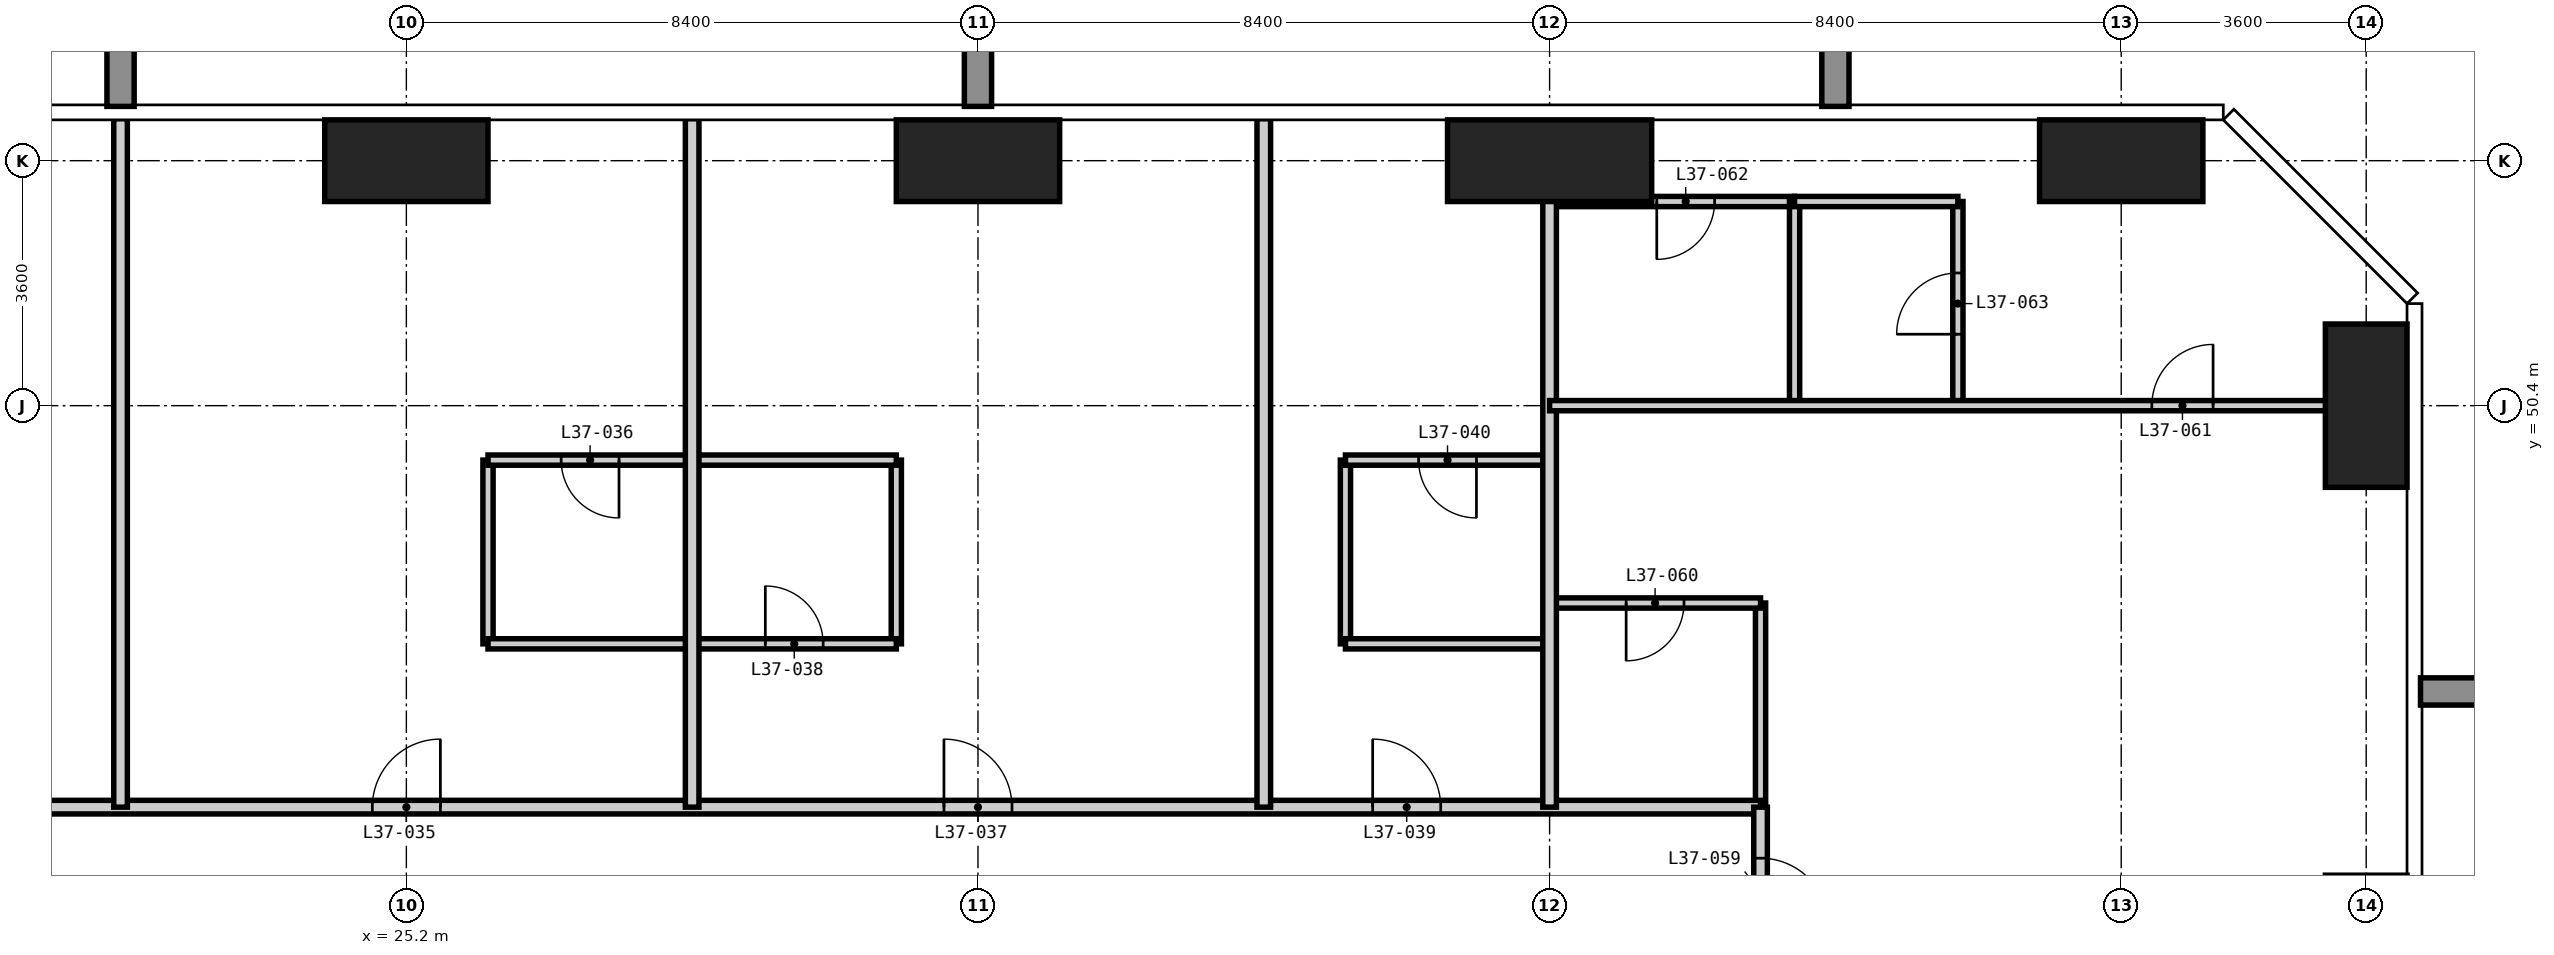
"""IFC4 building model, lengths in metres.
Left out: names, types, materials, properties, quantities, classifications, styles, units other than length and angle.
Written with IfcOpenShell. Run it as: python <this file> out.ifc"""

import sys

from ifc_helpers import new_model, si_unit, direction, frame, frame_2d, origin, origin_2d, place, context, subcontext, project, spatial, rectangle, extrude, element, fill, save


model = new_model("IFC4")
c1 = context("Model", 3, precision=1e-05, world=origin(), true_north=direction((0.0, 1.0)))
c2 = subcontext(c1, "Body", "Model", "MODEL_VIEW")
j1 = project(units=[si_unit("LENGTHUNIT", "METRE"), si_unit("PLANEANGLEUNIT", "RADIAN")], contexts=[c1])
p1 = place(None, origin())
s1 = spatial("IfcSite", under=j1, at=p1, CompositionType="ELEMENT")
p2 = place(p1, origin())
s2 = spatial("IfcBuilding", under=s1, at=p2, CompositionType="ELEMENT")
p3 = place(p2, frame((0.0, 0.0, 144.0)))
s3 = spatial("IfcBuildingStorey", under=s2, at=p3, CompositionType="ELEMENT", Elevation=144.0)
for number, where, z_axis, x_axis in (
    (1, (25.2, 54.0, -0.35), (0.0, 0.0, 1.0), (1.0, 0.0, 0.0)),
    (2, (33.6, 54.0, -0.35), (0.0, 0.0, 1.0), (1.0, 0.0, 0.0)),
):
    element("IfcColumn", number, at=place(p3, frame(where, z_axis=z_axis, x_axis=x_axis)), inside=s3, PredefinedType="COLUMN", context=c2, shape_type="SweptSolid", body=[
        extrude(rectangle(XDim=2.4, YDim=1.2, at=origin_2d()), origin(), (0.0, 0.0, 1.0), 3.6),
    ])
p4 = place(p3, frame((42.0, 54.0, -0.35), z_axis=(0.0, 0.0, 1.0), x_axis=(1.0, 0.0, 0.0)))
e3 = element("IfcColumn", 3, at=p4, inside=s3, PredefinedType="COLUMN", context=c2, shape_type="SweptSolid", body=[
    extrude(rectangle(XDim=3.0, YDim=1.2, at=origin_2d()), origin(), (0.0, 0.0, 1.0), 3.6),
])
p5 = place(p3, frame((50.4, 54.0, -0.35), z_axis=(0.0, 0.0, 1.0), x_axis=(1.0, 0.0, 0.0)))
e4 = element("IfcColumn", 4, at=p5, inside=s3, PredefinedType="COLUMN", context=c2, shape_type="SweptSolid", body=[
    extrude(rectangle(XDim=2.4, YDim=1.2, at=origin_2d()), origin(), (0.0, 0.0, 1.0), 3.6),
])
p6 = place(p3, frame((54.0, 50.4, -0.35), z_axis=(0.0, 0.0, 1.0), x_axis=(1.0, 0.0, 0.0)))
e5 = element("IfcColumn", 5, at=p6, inside=s3, PredefinedType="COLUMN", context=c2, shape_type="SweptSolid", body=[
    extrude(rectangle(XDim=1.2, YDim=2.4, at=origin_2d()), origin(), (0.0, 0.0, 1.0), 3.6),
])
for number, where, z_axis, x_axis in (
    (6, (26.4, 46.9, 0.0), (0.0, 0.0, 1.0), (0.0, 1.0, 0.0)),
    (7, (32.4, 46.9, 0.0), (0.0, 0.0, 1.0), (0.0, 1.0, 0.0)),
    (8, (39.0, 46.9, 0.0), (0.0, 0.0, 1.0), (0.0, 1.0, 0.0)),
):
    element("IfcWall", number, at=place(p3, frame(where, z_axis=z_axis, x_axis=x_axis)), inside=s3, PredefinedType="PARTITIONING", context=c2, shape_type="SweptSolid", body=[
        extrude(rectangle(XDim=2.7, YDim=0.15, at=frame_2d((1.35, 0.0))), origin(), (0.0, 0.0, 1.0), 3.25),
    ])
p7 = place(p3, frame((45.1, 44.5, 0.0), z_axis=(0.0, 0.0, 1.0), x_axis=(0.0, 1.0, 0.0)))
e9 = element("IfcWall", 9, at=p7, inside=s3, PredefinedType="PARTITIONING", context=c2, shape_type="SweptSolid", body=[
    extrude(rectangle(XDim=3.0, YDim=0.15, at=frame_2d((1.5, 0.0))), origin(), (0.0, 0.0, 1.0), 3.25),
])
p8 = place(p3, frame((26.4, 46.9, 0.0), z_axis=(0.0, 0.0, 1.0), x_axis=(1.0, 0.0, 0.0)))
e10 = element("IfcWall", 10, at=p8, inside=s3, PredefinedType="PARTITIONING", context=c2, shape_type="SweptSolid", body=[
    extrude(rectangle(XDim=6.0, YDim=0.15, at=frame_2d((3.0, 0.0))), origin(), (0.0, 0.0, 1.0), 3.25),
])
p9 = place(p8, frame((4.075, 0.0, 0.0)))
e11 = element("IfcOpeningElement", 11, at=p9, cuts=e10, PredefinedType="OPENING", context=c2, shape_type="SweptSolid", body=[
    extrude(rectangle(XDim=0.85, YDim=2.1, at=frame_2d((0.425, 1.05))), frame((0.0, 0.085, 0.0), z_axis=(0.0, -1.0, 0.0), x_axis=(1.0, 0.0, 0.0)), (0.0, 0.0, 1.0), 0.17),
])
p10 = place(p3, frame((39.0, 46.9, 0.0), z_axis=(0.0, 0.0, 1.0), x_axis=(1.0, 0.0, 0.0)))
e12 = element("IfcWall", 12, at=p10, inside=s3, PredefinedType="PARTITIONING", context=c2, shape_type="SweptSolid", body=[
    extrude(rectangle(XDim=3.0, YDim=0.15, at=frame_2d((1.5, 0.0))), origin(), (0.0, 0.0, 1.0), 3.25),
])
p11 = place(p3, frame((42.0, 47.5, 0.0), z_axis=(0.0, 0.0, 1.0), x_axis=(1.0, 0.0, 0.0)))
e13 = element("IfcWall", 13, at=p11, inside=s3, PredefinedType="PARTITIONING", context=c2, shape_type="SweptSolid", body=[
    extrude(rectangle(XDim=3.1, YDim=0.15, at=frame_2d((1.55, 0.0))), origin(), (0.0, 0.0, 1.0), 3.25),
])
p12 = place(p11, frame((1.125, 0.0, 0.0)))
e14 = element("IfcOpeningElement", 14, at=p12, cuts=e13, PredefinedType="OPENING", context=c2, shape_type="SweptSolid", body=[
    extrude(rectangle(XDim=0.85, YDim=2.1, at=frame_2d((0.425, 1.05))), frame((0.0, 0.085, 0.0), z_axis=(0.0, -1.0, 0.0), x_axis=(1.0, 0.0, 0.0)), (0.0, 0.0, 1.0), 0.17),
])
p13 = place(p3, frame((26.4, 49.6, 0.0), z_axis=(0.0, 0.0, 1.0), x_axis=(1.0, 0.0, 0.0)))
e15 = element("IfcWall", 15, at=p13, inside=s3, PredefinedType="PARTITIONING", context=c2, shape_type="SweptSolid", body=[
    extrude(rectangle(XDim=6.0, YDim=0.15, at=frame_2d((3.0, 0.0))), origin(), (0.0, 0.0, 1.0), 3.25),
])
p14 = place(p13, frame((1.075, 0.0, 0.0)))
e16 = element("IfcOpeningElement", 16, at=p14, cuts=e15, PredefinedType="OPENING", context=c2, shape_type="SweptSolid", body=[
    extrude(rectangle(XDim=0.85, YDim=2.1, at=frame_2d((0.425, 1.05))), frame((0.0, 0.085, 0.0), z_axis=(0.0, -1.0, 0.0), x_axis=(1.0, 0.0, 0.0)), (0.0, 0.0, 1.0), 0.17),
])
p15 = place(p3, frame((39.0, 49.6, 0.0), z_axis=(0.0, 0.0, 1.0), x_axis=(1.0, 0.0, 0.0)))
e17 = element("IfcWall", 17, at=p15, inside=s3, PredefinedType="PARTITIONING", context=c2, shape_type="SweptSolid", body=[
    extrude(rectangle(XDim=3.0, YDim=0.15, at=frame_2d((1.5, 0.0))), origin(), (0.0, 0.0, 1.0), 3.25),
])
p16 = place(p15, frame((1.075, 0.0, 0.0)))
e18 = element("IfcOpeningElement", 18, at=p16, cuts=e17, PredefinedType="OPENING", context=c2, shape_type="SweptSolid", body=[
    extrude(rectangle(XDim=0.85, YDim=2.1, at=frame_2d((0.425, 1.05))), frame((0.0, 0.085, 0.0), z_axis=(0.0, -1.0, 0.0), x_axis=(1.0, 0.0, 0.0)), (0.0, 0.0, 1.0), 0.17),
])
p17 = place(p3, frame((42.0, 53.4, 0.0), z_axis=(0.0, 0.0, 1.0), x_axis=(1.0, 0.0, 0.0)))
e19 = element("IfcWall", 19, at=p17, inside=s3, PredefinedType="PARTITIONING", context=c2, shape_type="SweptSolid", body=[
    extrude(rectangle(XDim=3.6, YDim=0.15, at=frame_2d((1.8, 0.0))), origin(), (0.0, 0.0, 1.0), 3.25),
])
p18 = place(p17, frame((1.575, 0.0, 0.0)))
e20 = element("IfcOpeningElement", 20, at=p18, cuts=e19, PredefinedType="OPENING", context=c2, shape_type="SweptSolid", body=[
    extrude(rectangle(XDim=0.85, YDim=2.1, at=frame_2d((0.425, 1.05))), frame((0.0, 0.085, 0.0), z_axis=(0.0, -1.0, 0.0), x_axis=(1.0, 0.0, 0.0)), (0.0, 0.0, 1.0), 0.17),
])
p19 = place(p3, frame((12.6, 44.5, 0.0), z_axis=(0.0, 0.0, 1.0), x_axis=(1.0, 0.0, 0.0)))
e21 = element("IfcWall", 21, at=p19, inside=s3, PredefinedType="PARTITIONING", context=c2, shape_type="SweptSolid", body=[
    extrude(rectangle(XDim=32.5, YDim=0.2, at=frame_2d((16.25, 0.0))), origin(), (0.0, 0.0, 1.0), 3.25),
])
p20 = place(p19, frame((5.8, 0.0, 0.0)))
e22 = element("IfcOpeningElement", 22, at=p20, cuts=e21, PredefinedType="OPENING", context=c2, shape_type="SweptSolid", body=[
    extrude(rectangle(XDim=1.0, YDim=2.2, at=frame_2d((0.5, 1.1))), frame((0.0, 0.11, 0.0), z_axis=(0.0, -1.0, 0.0), x_axis=(1.0, 0.0, 0.0)), (0.0, 0.0, 1.0), 0.22),
])
p21 = place(p19, frame((12.1, 0.0, 0.0)))
e23 = element("IfcOpeningElement", 23, at=p21, cuts=e21, PredefinedType="OPENING", context=c2, shape_type="SweptSolid", body=[
    extrude(rectangle(XDim=1.0, YDim=2.2, at=frame_2d((0.5, 1.1))), frame((0.0, 0.11, 0.0), z_axis=(0.0, -1.0, 0.0), x_axis=(1.0, 0.0, 0.0)), (0.0, 0.0, 1.0), 0.22),
])
p22 = place(p19, frame((20.5, 0.0, 0.0)))
e24 = element("IfcOpeningElement", 24, at=p22, cuts=e21, PredefinedType="OPENING", context=c2, shape_type="SweptSolid", body=[
    extrude(rectangle(XDim=1.0, YDim=2.2, at=frame_2d((0.5, 1.1))), frame((0.0, 0.11, 0.0), z_axis=(0.0, -1.0, 0.0), x_axis=(1.0, 0.0, 0.0)), (0.0, 0.0, 1.0), 0.22),
])
p23 = place(p19, frame((26.8, 0.0, 0.0)))
e25 = element("IfcOpeningElement", 25, at=p23, cuts=e21, PredefinedType="OPENING", context=c2, shape_type="SweptSolid", body=[
    extrude(rectangle(XDim=1.0, YDim=2.2, at=frame_2d((0.5, 1.1))), frame((0.0, 0.11, 0.0), z_axis=(0.0, -1.0, 0.0), x_axis=(1.0, 0.0, 0.0)), (0.0, 0.0, 1.0), 0.22),
])
p24 = place(p3, frame((45.1, 44.5, 0.0), z_axis=(0.0, 0.0, 1.0), x_axis=(0.0, -1.0, 0.0)))
e26 = element("IfcWall", 26, at=p24, inside=s3, PredefinedType="PARTITIONING", context=c2, shape_type="SweptSolid", body=[
    extrude(rectangle(XDim=31.4, YDim=0.2, at=frame_2d((15.7, 0.0))), origin(), (0.0, 0.0, 1.0), 3.25),
])
p25 = place(p24, frame((24.2, 0.0, 0.0)))
e27 = element("IfcOpeningElement", 27, at=p25, cuts=e26, PredefinedType="OPENING", context=c2, shape_type="SweptSolid", body=[
    extrude(rectangle(XDim=1.0, YDim=2.2, at=frame_2d((0.5, 1.1))), frame((0.0, 0.11, 0.0), z_axis=(0.0, -1.0, 0.0), x_axis=(1.0, 0.0, 0.0)), (0.0, 0.0, 1.0), 0.22),
])
p26 = place(p24, frame((13.4, 0.0, 0.0)))
e28 = element("IfcOpeningElement", 28, at=p26, cuts=e26, PredefinedType="OPENING", context=c2, shape_type="SweptSolid", body=[
    extrude(rectangle(XDim=1.0, YDim=2.2, at=frame_2d((0.5, 1.1))), frame((0.0, 0.11, 0.0), z_axis=(0.0, -1.0, 0.0), x_axis=(1.0, 0.0, 0.0)), (0.0, 0.0, 1.0), 0.22),
])
p27 = place(p24, frame((7.4, 0.0, 0.0)))
e29 = element("IfcOpeningElement", 29, at=p27, cuts=e26, PredefinedType="OPENING", context=c2, shape_type="SweptSolid", body=[
    extrude(rectangle(XDim=1.0, YDim=2.2, at=frame_2d((0.5, 1.1))), frame((0.0, 0.11, 0.0), z_axis=(0.0, -1.0, 0.0), x_axis=(1.0, 0.0, 0.0)), (0.0, 0.0, 1.0), 0.22),
])
p28 = place(p24, frame((29.05, 0.0, 0.0)))
e30 = element("IfcOpeningElement", 30, at=p28, cuts=e26, PredefinedType="OPENING", context=c2, shape_type="SweptSolid", body=[
    extrude(rectangle(XDim=1.0, YDim=2.2, at=frame_2d((0.5, 1.1))), frame((0.0, 0.11, 0.0), z_axis=(0.0, -1.0, 0.0), x_axis=(1.0, 0.0, 0.0)), (0.0, 0.0, 1.0), 0.22),
])
p29 = place(p24, frame((0.75, 0.0, 0.0)))
e31 = element("IfcOpeningElement", 31, at=p29, cuts=e26, PredefinedType="OPENING", context=c2, shape_type="SweptSolid", body=[
    extrude(rectangle(XDim=1.0, YDim=2.2, at=frame_2d((0.5, 1.1))), frame((0.0, 0.11, 0.0), z_axis=(0.0, -1.0, 0.0), x_axis=(1.0, 0.0, 0.0)), (0.0, 0.0, 1.0), 0.22),
])
for number, where, z_axis, x_axis in (
    (32, (21.0, 44.5, 0.0), (0.0, 0.0, 1.0), (0.0, 1.0, 0.0)),
    (33, (29.4, 44.5, 0.0), (0.0, 0.0, 1.0), (0.0, 1.0, 0.0)),
    (34, (37.8, 44.5, 0.0), (0.0, 0.0, 1.0), (0.0, 1.0, 0.0)),
    (35, (42.0, 44.5, 0.0), (0.0, 0.0, 1.0), (0.0, 1.0, 0.0)),
):
    element("IfcWall", number, at=place(p3, frame(where, z_axis=z_axis, x_axis=x_axis)), inside=s3, PredefinedType="PARTITIONING", context=c2, shape_type="SweptSolid", body=[
        extrude(rectangle(XDim=10.118, YDim=0.2, at=frame_2d((5.059, 0.0))), origin(), (0.0, 0.0, 1.0), 3.25),
    ])
p30 = place(p3, frame((45.6, 50.4, 0.0), z_axis=(0.0, 0.0, 1.0), x_axis=(0.0, 1.0, 0.0)))
e36 = element("IfcWall", 36, at=p30, inside=s3, PredefinedType="PARTITIONING", context=c2, shape_type="SweptSolid", body=[
    extrude(rectangle(XDim=3.0, YDim=0.15, at=frame_2d((1.5, 0.0))), origin(), (0.0, 0.0, 1.0), 3.25),
])
p31 = place(p3, frame((48.0, 50.4, 0.0), z_axis=(0.0, 0.0, 1.0), x_axis=(0.0, 1.0, 0.0)))
e37 = element("IfcWall", 37, at=p31, inside=s3, PredefinedType="PARTITIONING", context=c2, shape_type="SweptSolid", body=[
    extrude(rectangle(XDim=3.0, YDim=0.15, at=frame_2d((1.5, 0.0))), origin(), (0.0, 0.0, 1.0), 3.25),
])
p32 = place(p31, frame((1.05, 0.0, 0.0)))
e38 = element("IfcOpeningElement", 38, at=p32, cuts=e37, PredefinedType="OPENING", context=c2, shape_type="SweptSolid", body=[
    extrude(rectangle(XDim=0.9, YDim=2.1, at=frame_2d((0.45, 1.05))), frame((0.0, 0.085, 0.0), z_axis=(0.0, -1.0, 0.0), x_axis=(1.0, 0.0, 0.0)), (0.0, 0.0, 1.0), 0.17),
])
p33 = place(p3, frame((42.0, 50.4, 0.0), z_axis=(0.0, 0.0, 1.0), x_axis=(1.0, 0.0, 0.0)))
e39 = element("IfcWall", 39, at=p33, inside=s3, PredefinedType="PARTITIONING", context=c2, shape_type="SweptSolid", body=[
    extrude(rectangle(XDim=12.618, YDim=0.15, at=frame_2d((6.309, 0.0))), origin(), (0.0, 0.0, 1.0), 3.25),
])
p34 = place(p33, frame((8.85, 0.0, 0.0)))
e40 = element("IfcOpeningElement", 40, at=p34, cuts=e39, PredefinedType="OPENING", context=c2, shape_type="SweptSolid", body=[
    extrude(rectangle(XDim=0.9, YDim=2.1, at=frame_2d((0.45, 1.05))), frame((0.0, 0.085, 0.0), z_axis=(0.0, -1.0, 0.0), x_axis=(1.0, 0.0, 0.0)), (0.0, 0.0, 1.0), 0.17),
])
p35 = place(p3, frame((45.6, 53.4, 0.0), z_axis=(0.0, 0.0, 1.0), x_axis=(1.0, 0.0, 0.0)))
e41 = element("IfcWall", 41, at=p35, inside=s3, PredefinedType="PARTITIONING", context=c2, shape_type="SweptSolid", body=[
    extrude(rectangle(XDim=2.4, YDim=0.15, at=frame_2d((1.2, 0.0))), origin(), (0.0, 0.0, 1.0), 3.25),
])
p36 = place(p21, origin())
e42 = element("IfcDoor", 42, at=p36, inside=s3, OperationType="SINGLE_SWING_RIGHT", PredefinedType="DOOR", context=c2, shape_type="SweptSolid", body=[
    extrude(rectangle(XDim=1.0, YDim=2.2, at=frame_2d((0.5, 1.1))), frame((0.0, 0.025, 0.0), z_axis=(0.0, -1.0, 0.0), x_axis=(1.0, 0.0, 0.0)), (0.0, 0.0, 1.0), 0.05),
])
fill(e23, e42)
p37 = place(p14, frame((0.85, 0.0, 0.0), z_axis=(0.0, 0.0, 1.0), x_axis=(-1.0, 0.0, 0.0)))
e43 = element("IfcDoor", 43, at=p37, inside=s3, OperationType="SINGLE_SWING_LEFT", PredefinedType="DOOR", context=c2, shape_type="SweptSolid", body=[
    extrude(rectangle(XDim=0.85, YDim=2.1, at=frame_2d((0.425, 1.05))), frame((0.0, 0.025, 0.0), z_axis=(0.0, -1.0, 0.0), x_axis=(1.0, 0.0, 0.0)), (0.0, 0.0, 1.0), 0.05),
])
fill(e16, e43)
p38 = place(p22, origin())
e44 = element("IfcDoor", 44, at=p38, inside=s3, OperationType="SINGLE_SWING_LEFT", PredefinedType="DOOR", context=c2, shape_type="SweptSolid", body=[
    extrude(rectangle(XDim=1.0, YDim=2.2, at=frame_2d((0.5, 1.1))), frame((0.0, 0.025, 0.0), z_axis=(0.0, -1.0, 0.0), x_axis=(1.0, 0.0, 0.0)), (0.0, 0.0, 1.0), 0.05),
])
fill(e24, e44)
p39 = place(p9, origin())
e45 = element("IfcDoor", 45, at=p39, inside=s3, OperationType="SINGLE_SWING_LEFT", PredefinedType="DOOR", context=c2, shape_type="SweptSolid", body=[
    extrude(rectangle(XDim=0.85, YDim=2.1, at=frame_2d((0.425, 1.05))), frame((0.0, 0.025, 0.0), z_axis=(0.0, -1.0, 0.0), x_axis=(1.0, 0.0, 0.0)), (0.0, 0.0, 1.0), 0.05),
])
fill(e11, e45)
p40 = place(p23, origin())
e46 = element("IfcDoor", 46, at=p40, inside=s3, OperationType="SINGLE_SWING_LEFT", PredefinedType="DOOR", context=c2, shape_type="SweptSolid", body=[
    extrude(rectangle(XDim=1.0, YDim=2.2, at=frame_2d((0.5, 1.1))), frame((0.0, 0.025, 0.0), z_axis=(0.0, -1.0, 0.0), x_axis=(1.0, 0.0, 0.0)), (0.0, 0.0, 1.0), 0.05),
])
fill(e25, e46)
p41 = place(p16, frame((0.85, 0.0, 0.0), z_axis=(0.0, 0.0, 1.0), x_axis=(-1.0, 0.0, 0.0)))
e47 = element("IfcDoor", 47, at=p41, inside=s3, OperationType="SINGLE_SWING_LEFT", PredefinedType="DOOR", context=c2, shape_type="SweptSolid", body=[
    extrude(rectangle(XDim=0.85, YDim=2.1, at=frame_2d((0.425, 1.05))), frame((0.0, 0.025, 0.0), z_axis=(0.0, -1.0, 0.0), x_axis=(1.0, 0.0, 0.0)), (0.0, 0.0, 1.0), 0.05),
])
fill(e18, e47)
p42 = place(p29, origin())
e48 = element("IfcDoor", 48, at=p42, inside=s3, OperationType="SINGLE_SWING_RIGHT", PredefinedType="DOOR", context=c2, shape_type="SweptSolid", body=[
    extrude(rectangle(XDim=1.0, YDim=2.2, at=frame_2d((0.5, 1.1))), frame((0.0, 0.025, 0.0), z_axis=(0.0, -1.0, 0.0), x_axis=(1.0, 0.0, 0.0)), (0.0, 0.0, 1.0), 0.05),
])
fill(e31, e48)
p43 = place(p12, frame((0.85, 0.0, 0.0), z_axis=(0.0, 0.0, 1.0), x_axis=(-1.0, 0.0, 0.0)))
e49 = element("IfcDoor", 49, at=p43, inside=s3, OperationType="SINGLE_SWING_RIGHT", PredefinedType="DOOR", context=c2, shape_type="SweptSolid", body=[
    extrude(rectangle(XDim=0.85, YDim=2.1, at=frame_2d((0.425, 1.05))), frame((0.0, 0.025, 0.0), z_axis=(0.0, -1.0, 0.0), x_axis=(1.0, 0.0, 0.0)), (0.0, 0.0, 1.0), 0.05),
])
fill(e14, e49)
p44 = place(p34, origin())
e50 = element("IfcDoor", 50, at=p44, inside=s3, OperationType="SINGLE_SWING_RIGHT", PredefinedType="DOOR", context=c2, shape_type="SweptSolid", body=[
    extrude(rectangle(XDim=0.9, YDim=2.1, at=frame_2d((0.45, 1.05))), frame((0.0, 0.025, 0.0), z_axis=(0.0, -1.0, 0.0), x_axis=(1.0, 0.0, 0.0)), (0.0, 0.0, 1.0), 0.05),
])
fill(e40, e50)
p45 = place(p18, frame((0.85, 0.0, 0.0), z_axis=(0.0, 0.0, 1.0), x_axis=(-1.0, 0.0, 0.0)))
e51 = element("IfcDoor", 51, at=p45, inside=s3, OperationType="SINGLE_SWING_RIGHT", PredefinedType="DOOR", context=c2, shape_type="SweptSolid", body=[
    extrude(rectangle(XDim=0.85, YDim=2.1, at=frame_2d((0.425, 1.05))), frame((0.0, 0.025, 0.0), z_axis=(0.0, -1.0, 0.0), x_axis=(1.0, 0.0, 0.0)), (0.0, 0.0, 1.0), 0.05),
])
fill(e20, e51)
p46 = place(p32, origin())
e52 = element("IfcDoor", 52, at=p46, inside=s3, OperationType="SINGLE_SWING_LEFT", PredefinedType="DOOR", context=c2, shape_type="SweptSolid", body=[
    extrude(rectangle(XDim=0.9, YDim=2.1, at=frame_2d((0.45, 1.05))), frame((0.0, 0.025, 0.0), z_axis=(0.0, -1.0, 0.0), x_axis=(1.0, 0.0, 0.0)), (0.0, 0.0, 1.0), 0.05),
])
fill(e38, e52)
save(model, sys.argv[1])
